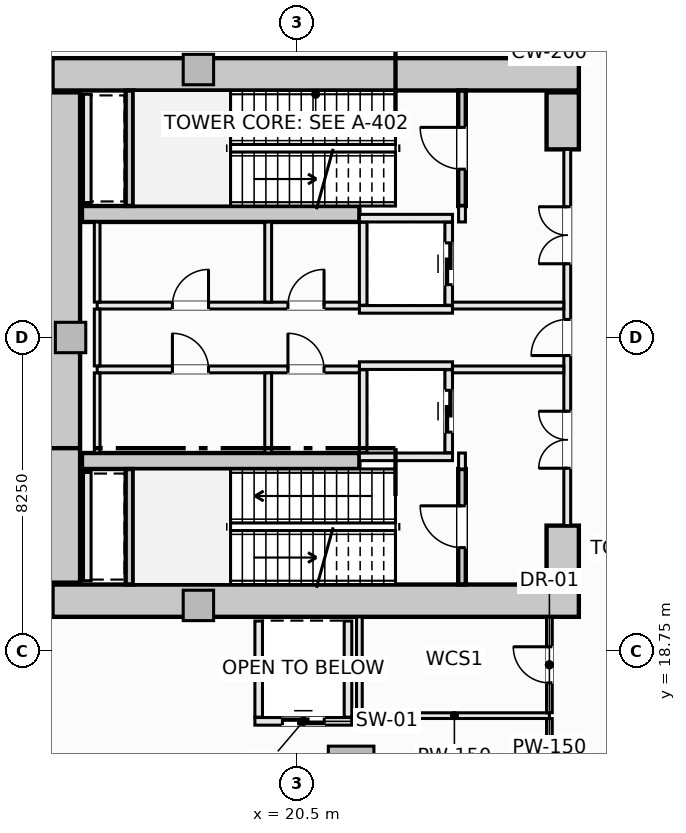
"""IFC4 building model, lengths in metres.
Left out: names, types, materials, properties, quantities, classifications, styles, units other than length and angle.
Written with IfcOpenShell. Run it as: python <this file> out.ifc"""

import sys

from ifc_helpers import new_model, si_unit, direction, frame, frame_2d, origin, origin_2d, place, context, subcontext, project, spatial, rectangle, extrude, element, fill, save


model = new_model("IFC4")
c1 = context("Model", 3, precision=1e-05, world=origin(), true_north=direction((0.0, 1.0)))
c2 = subcontext(c1, "Body", "Model", "MODEL_VIEW")
j1 = project(units=[si_unit("LENGTHUNIT", "METRE"), si_unit("PLANEANGLEUNIT", "RADIAN")], contexts=[c1])
p1 = place(None, origin())
s1 = spatial("IfcSite", under=j1, at=p1, CompositionType="ELEMENT")
p2 = place(p1, origin())
s2 = spatial("IfcBuilding", under=s1, at=p2, CompositionType="ELEMENT")
p3 = place(p2, origin())
s3 = spatial("IfcBuildingStorey", under=s2, at=p3, CompositionType="ELEMENT", Elevation=0.0)
for number, where, z_axis, x_axis in (
    (1, (14.075, 33.925, -0.36), (0.0, 0.0, 1.0), (1.0, 0.0, 0.0)),
    (2, (14.075, 20.075, -0.36), (0.0, 0.0, 1.0), (1.0, 0.0, 0.0)),
):
    element("IfcWall", number, at=place(p3, frame(where, z_axis=z_axis, x_axis=x_axis)), inside=s3, PredefinedType="SHEAR", context=c2, shape_type="SweptSolid", body=[
        extrude(rectangle(XDim=13.85, YDim=0.85, at=frame_2d((6.925, 0.0))), origin(), (0.0, 0.0, 1.0), 5.1),
    ])
p4 = place(p3, frame((14.375, 20.55, -0.36), z_axis=(0.0, 0.0, 1.0), x_axis=(0.0, 1.0, 0.0)))
e3 = element("IfcWall", 3, at=p4, inside=s3, PredefinedType="SHEAR", context=c2, shape_type="SweptSolid", body=[
    extrude(rectangle(XDim=12.9, YDim=0.85, at=frame_2d((6.45, 0.0))), origin(), (0.0, 0.0, 1.0), 5.1),
])
for number, where, z_axis, x_axis in (
    (4, (27.5, 31.95, -0.36), (0.0, 0.0, 1.0), (0.0, 1.0, 0.0)),
    (5, (27.5, 20.55, -0.36), (0.0, 0.0, 1.0), (0.0, 1.0, 0.0)),
):
    element("IfcWall", number, at=place(p3, frame(where, z_axis=z_axis, x_axis=x_axis)), inside=s3, PredefinedType="SHEAR", context=c2, shape_type="SweptSolid", body=[
        extrude(rectangle(XDim=1.5, YDim=0.85, at=frame_2d((0.75, 0.0))), origin(), (0.0, 0.0, 1.0), 5.1),
    ])
for number, where, z_axis, x_axis in (
    (6, (14.85, 30.25, -0.36), (0.0, 0.0, 1.0), (1.0, 0.0, 0.0)),
    (7, (14.85, 23.75, -0.36), (0.0, 0.0, 1.0), (1.0, 0.0, 0.0)),
):
    element("IfcWall", number, at=place(p3, frame(where, z_axis=z_axis, x_axis=x_axis)), inside=s3, PredefinedType="SHEAR", context=c2, shape_type="SweptSolid", body=[
        extrude(rectangle(XDim=7.3, YDim=0.42, at=frame_2d((3.65, 0.0))), origin(), (0.0, 0.0, 1.0), 5.1),
    ])
p5 = place(p3, frame((21.932, 15.648, -0.36), z_axis=(0.0, 0.0, 1.0), x_axis=(1.0, 0.0, 0.0)))
e8 = element("IfcColumn", 8, at=p5, inside=s3, PredefinedType="COLUMN", context=c2, shape_type="SweptSolid", body=[
    extrude(rectangle(XDim=1.2, YDim=1.2, at=origin_2d()), origin(), (0.0, 0.0, 1.0), 5.1),
])
for number, where, z_axis, x_axis in (
    (9, (17.914, 34.05, -0.36), (0.0, 0.0, 1.0), (1.0, 0.0, 0.0)),
    (10, (14.55, 27.0, -0.36), (0.0, 0.0, 1.0), (1.0, 0.0, 0.0)),
    (11, (17.914, 19.95, -0.36), (0.0, 0.0, 1.0), (1.0, 0.0, 0.0)),
):
    element("IfcColumn", number, at=place(p3, frame(where, z_axis=z_axis, x_axis=x_axis)), inside=s3, PredefinedType="PILASTER", context=c2, shape_type="SweptSolid", body=[
        extrude(rectangle(XDim=0.8, YDim=0.8, at=origin_2d()), origin(), (0.0, 0.0, 1.0), 5.1),
    ])
p6 = place(p3, frame((24.85, 30.46, -0.36), z_axis=(0.0, 0.0, 1.0), x_axis=(0.0, 1.0, 0.0)))
e12 = element("IfcWall", 12, at=p6, inside=s3, PredefinedType="SHEAR", context=c2, shape_type="SweptSolid", body=[
    extrude(rectangle(XDim=3.038, YDim=0.2, at=frame_2d((1.519, 0.0))), origin(), (0.0, 0.0, 1.0), 5.1),
])
p7 = place(p6, frame((0.969, 0.0, 0.36)))
e13 = element("IfcOpeningElement", 13, at=p7, cuts=e12, PredefinedType="OPENING", context=c2, shape_type="SweptSolid", body=[
    extrude(rectangle(XDim=1.1, YDim=2.15, at=frame_2d((0.55, 1.075))), frame((0.0, 0.11, 0.0), z_axis=(0.0, -1.0, 0.0), x_axis=(1.0, 0.0, 0.0)), (0.0, 0.0, 1.0), 0.22),
])
p8 = place(p3, frame((16.1, 30.462, -0.36), z_axis=(0.0, 0.0, 1.0), x_axis=(0.0, 1.0, 0.0)))
e14 = element("IfcWall", 14, at=p8, inside=s3, PredefinedType="SHEAR", context=c2, shape_type="SweptSolid", body=[
    extrude(rectangle(XDim=3.036, YDim=0.2, at=frame_2d((1.518, 0.0))), origin(), (0.0, 0.0, 1.0), 5.1),
])
p9 = place(p3, frame((24.85, 20.502, -0.36), z_axis=(0.0, 0.0, 1.0), x_axis=(0.0, 1.0, 0.0)))
e15 = element("IfcWall", 15, at=p9, inside=s3, PredefinedType="SHEAR", context=c2, shape_type="SweptSolid", body=[
    extrude(rectangle(XDim=3.038, YDim=0.2, at=frame_2d((1.519, 0.0))), origin(), (0.0, 0.0, 1.0), 5.1),
])
p10 = place(p9, frame((0.969, 0.0, 0.36)))
e16 = element("IfcOpeningElement", 16, at=p10, cuts=e15, PredefinedType="OPENING", context=c2, shape_type="SweptSolid", body=[
    extrude(rectangle(XDim=1.1, YDim=2.15, at=frame_2d((0.55, 1.075))), frame((0.0, 0.11, 0.0), z_axis=(0.0, -1.0, 0.0), x_axis=(1.0, 0.0, 0.0)), (0.0, 0.0, 1.0), 0.22),
])
p11 = place(p3, frame((16.1, 20.502, -0.36), z_axis=(0.0, 0.0, 1.0), x_axis=(0.0, 1.0, 0.0)))
e17 = element("IfcWall", 17, at=p11, inside=s3, PredefinedType="SHEAR", context=c2, shape_type="SweptSolid", body=[
    extrude(rectangle(XDim=3.036, YDim=0.2, at=frame_2d((1.518, 0.0))), origin(), (0.0, 0.0, 1.0), 5.1),
])
for number, where, z_axis, x_axis in (
    (18, (22.15, 30.14, 0.0), (0.0, 0.0, 1.0), (1.0, 0.0, 0.0)),
    (19, (22.15, 27.74, 0.0), (0.0, 0.0, 1.0), (1.0, 0.0, 0.0)),
):
    element("IfcWall", number, at=place(p3, frame(where, z_axis=z_axis, x_axis=x_axis)), inside=s3, PredefinedType="SOLIDWALL", context=c2, shape_type="SweptSolid", body=[
        extrude(rectangle(XDim=2.45, YDim=0.2, at=frame_2d((1.225, 0.0))), origin(), (0.0, 0.0, 1.0), 4.74),
    ])
p12 = place(p3, frame((22.25, 27.85, 0.0), z_axis=(0.0, 0.0, 1.0), x_axis=(0.0, 1.0, 0.0)))
e20 = element("IfcWall", 20, at=p12, inside=s3, PredefinedType="SOLIDWALL", context=c2, shape_type="SweptSolid", body=[
    extrude(rectangle(XDim=2.18, YDim=0.2, at=frame_2d((1.09, 0.0))), origin(), (0.0, 0.0, 1.0), 4.74),
])
p13 = place(p3, frame((24.5, 27.85, 0.0), z_axis=(0.0, 0.0, 1.0), x_axis=(0.0, 1.0, 0.0)))
e21 = element("IfcWall", 21, at=p13, inside=s3, PredefinedType="SOLIDWALL", context=c2, shape_type="SweptSolid", body=[
    extrude(rectangle(XDim=2.18, YDim=0.2, at=frame_2d((1.09, 0.0))), origin(), (0.0, 0.0, 1.0), 4.74),
])
p14 = place(p13, frame((0.54, 0.0, 0.0)))
e22 = element("IfcOpeningElement", 22, at=p14, cuts=e21, PredefinedType="OPENING", context=c2, shape_type="SweptSolid", body=[
    extrude(rectangle(XDim=1.1, YDim=2.2, at=frame_2d((0.55, 1.1))), frame((0.0, 0.11, 0.0), z_axis=(0.0, -1.0, 0.0), x_axis=(1.0, 0.0, 0.0)), (0.0, 0.0, 1.0), 0.22),
])
for number, where, z_axis, x_axis in (
    (23, (22.15, 26.26, 0.0), (0.0, 0.0, 1.0), (1.0, 0.0, 0.0)),
    (24, (22.15, 23.86, 0.0), (0.0, 0.0, 1.0), (1.0, 0.0, 0.0)),
):
    element("IfcWall", number, at=place(p3, frame(where, z_axis=z_axis, x_axis=x_axis)), inside=s3, PredefinedType="SOLIDWALL", context=c2, shape_type="SweptSolid", body=[
        extrude(rectangle(XDim=2.45, YDim=0.2, at=frame_2d((1.225, 0.0))), origin(), (0.0, 0.0, 1.0), 4.74),
    ])
p15 = place(p3, frame((22.25, 23.97, 0.0), z_axis=(0.0, 0.0, 1.0), x_axis=(0.0, 1.0, 0.0)))
e25 = element("IfcWall", 25, at=p15, inside=s3, PredefinedType="SOLIDWALL", context=c2, shape_type="SweptSolid", body=[
    extrude(rectangle(XDim=2.18, YDim=0.2, at=frame_2d((1.09, 0.0))), origin(), (0.0, 0.0, 1.0), 4.74),
])
p16 = place(p3, frame((24.5, 23.97, 0.0), z_axis=(0.0, 0.0, 1.0), x_axis=(0.0, 1.0, 0.0)))
e26 = element("IfcWall", 26, at=p16, inside=s3, PredefinedType="SOLIDWALL", context=c2, shape_type="SweptSolid", body=[
    extrude(rectangle(XDim=2.18, YDim=0.2, at=frame_2d((1.09, 0.0))), origin(), (0.0, 0.0, 1.0), 4.74),
])
p17 = place(p16, frame((0.54, 0.0, 0.0)))
e27 = element("IfcOpeningElement", 27, at=p17, cuts=e26, PredefinedType="OPENING", context=c2, shape_type="SweptSolid", body=[
    extrude(rectangle(XDim=1.1, YDim=2.2, at=frame_2d((0.55, 1.1))), frame((0.0, 0.11, 0.0), z_axis=(0.0, -1.0, 0.0), x_axis=(1.0, 0.0, 0.0)), (0.0, 0.0, 1.0), 0.22),
])
p18 = place(p3, frame((19.4, 16.9, 0.0), z_axis=(0.0, 0.0, 1.0), x_axis=(1.0, 0.0, 0.0)))
e28 = element("IfcWall", 28, at=p18, inside=s3, PredefinedType="SOLIDWALL", context=c2, shape_type="SweptSolid", body=[
    extrude(rectangle(XDim=2.55, YDim=0.2, at=frame_2d((1.275, 0.0))), origin(), (0.0, 0.0, 1.0), 4.74),
])
p19 = place(p18, frame((0.725, 0.0, 0.0)))
e29 = element("IfcOpeningElement", 29, at=p19, cuts=e28, PredefinedType="OPENING", context=c2, shape_type="SweptSolid", body=[
    extrude(rectangle(XDim=1.1, YDim=2.2, at=frame_2d((0.55, 1.1))), frame((0.0, 0.11, 0.0), z_axis=(0.0, -1.0, 0.0), x_axis=(1.0, 0.0, 0.0)), (0.0, 0.0, 1.0), 0.22),
])
for number, where, z_axis, x_axis in (
    (30, (19.5, 17.01, 0.0), (0.0, 0.0, 1.0), (0.0, 1.0, 0.0)),
    (31, (21.85, 17.01, 0.0), (0.0, 0.0, 1.0), (0.0, 1.0, 0.0)),
):
    element("IfcWall", number, at=place(p3, frame(where, z_axis=z_axis, x_axis=x_axis)), inside=s3, PredefinedType="SOLIDWALL", context=c2, shape_type="SweptSolid", body=[
        extrude(rectangle(XDim=2.53, YDim=0.2, at=frame_2d((1.265, 0.0))), origin(), (0.0, 0.0, 1.0), 4.74),
    ])
for number, where, z_axis, x_axis in (
    (32, (14.99, 30.55, 0.0), (0.0, 0.0, 1.0), (0.0, 1.0, 0.0)),
    (33, (14.99, 20.6, 0.0), (0.0, 0.0, 1.0), (0.0, 1.0, 0.0)),
):
    element("IfcWall", number, at=place(p3, frame(where, z_axis=z_axis, x_axis=x_axis)), inside=s3, PredefinedType="SOLIDWALL", context=c2, shape_type="SweptSolid", body=[
        extrude(rectangle(XDim=2.85, YDim=0.2, at=frame_2d((1.425, 0.0))), origin(), (0.0, 0.0, 1.0), 4.74),
    ])
for number, where, z_axis, x_axis in (
    (34, (24.85, 23.54, 0.0), (0.0, 0.0, 1.0), (0.0, 1.0, 0.0)),
    (35, (24.85, 30.04, 0.0), (0.0, 0.0, 1.0), (0.0, 1.0, 0.0)),
):
    element("IfcWall", number, at=place(p3, frame(where, z_axis=z_axis, x_axis=x_axis)), inside=s3, PredefinedType="SOLIDWALL", context=c2, shape_type="SweptSolid", body=[
        extrude(rectangle(XDim=0.42, YDim=0.18, at=frame_2d((0.21, 0.0))), origin(), (0.0, 0.0, 1.0), 4.74),
    ])
p20 = place(p3, frame((27.62, 22.05, 0.0), z_axis=(0.0, 0.0, 1.0), x_axis=(0.0, 1.0, 0.0)))
e36 = element("IfcWall", 36, at=p20, inside=s3, PredefinedType="SOLIDWALL", context=c2, shape_type="SweptSolid", body=[
    extrude(rectangle(XDim=9.9, YDim=0.18, at=frame_2d((4.95, 0.0))), origin(), (0.0, 0.0, 1.0), 3.832),
])
p21 = place(p20, frame((4.475, 0.0, 0.0)))
e37 = element("IfcOpeningElement", 37, at=p21, cuts=e36, PredefinedType="OPENING", context=c2, shape_type="SweptSolid", body=[
    extrude(rectangle(XDim=0.95, YDim=2.1, at=frame_2d((0.475, 1.05))), frame((0.0, 0.1, 0.0), z_axis=(0.0, -1.0, 0.0), x_axis=(1.0, 0.0, 0.0)), (0.0, 0.0, 1.0), 0.2),
])
p22 = place(p20, frame((6.89, 0.0, 0.0)))
e38 = element("IfcOpeningElement", 38, at=p22, cuts=e36, PredefinedType="OPENING", context=c2, shape_type="SweptSolid", body=[
    extrude(rectangle(XDim=1.5, YDim=2.2, at=frame_2d((0.75, 1.1))), frame((0.0, 0.1, 0.0), z_axis=(0.0, -1.0, 0.0), x_axis=(1.0, 0.0, 0.0)), (0.0, 0.0, 1.0), 0.2),
])
p23 = place(p20, frame((1.51, 0.0, 0.0)))
e39 = element("IfcOpeningElement", 39, at=p23, cuts=e36, PredefinedType="OPENING", context=c2, shape_type="SweptSolid", body=[
    extrude(rectangle(XDim=1.5, YDim=2.2, at=frame_2d((0.75, 1.1))), frame((0.0, 0.1, 0.0), z_axis=(0.0, -1.0, 0.0), x_axis=(1.0, 0.0, 0.0)), (0.0, 0.0, 1.0), 0.2),
])
p24 = place(p3, frame((15.25, 27.84, 0.0), z_axis=(0.0, 0.0, 1.0), x_axis=(1.0, 0.0, 0.0)))
e40 = element("IfcWall", 40, at=p24, inside=s3, PredefinedType="SOLIDWALL", context=c2, shape_type="SweptSolid", body=[
    extrude(rectangle(XDim=6.9, YDim=0.18, at=frame_2d((3.45, 0.0))), origin(), (0.0, 0.0, 1.0), 4.74),
])
p25 = place(p24, frame((5.02, 0.0, 0.0)))
e41 = element("IfcOpeningElement", 41, at=p25, cuts=e40, PredefinedType="OPENING", context=c2, shape_type="SweptSolid", body=[
    extrude(rectangle(XDim=0.95, YDim=2.1, at=frame_2d((0.475, 1.05))), frame((0.0, 0.1, 0.0), z_axis=(0.0, -1.0, 0.0), x_axis=(1.0, 0.0, 0.0)), (0.0, 0.0, 1.0), 0.2),
])
p26 = place(p24, frame((1.98, 0.0, 0.0)))
e42 = element("IfcOpeningElement", 42, at=p26, cuts=e40, PredefinedType="OPENING", context=c2, shape_type="SweptSolid", body=[
    extrude(rectangle(XDim=0.95, YDim=2.1, at=frame_2d((0.475, 1.05))), frame((0.0, 0.1, 0.0), z_axis=(0.0, -1.0, 0.0), x_axis=(1.0, 0.0, 0.0)), (0.0, 0.0, 1.0), 0.2),
])
p27 = place(p3, frame((24.6, 27.84, 0.0), z_axis=(0.0, 0.0, 1.0), x_axis=(1.0, 0.0, 0.0)))
e43 = element("IfcWall", 43, at=p27, inside=s3, PredefinedType="SOLIDWALL", context=c2, shape_type="SweptSolid", body=[
    extrude(rectangle(XDim=2.928, YDim=0.18, at=frame_2d((1.464, 0.0))), origin(), (0.0, 0.0, 1.0), 4.74),
])
p28 = place(p3, frame((15.25, 26.16, 0.0), z_axis=(0.0, 0.0, 1.0), x_axis=(1.0, 0.0, 0.0)))
e44 = element("IfcWall", 44, at=p28, inside=s3, PredefinedType="SOLIDWALL", context=c2, shape_type="SweptSolid", body=[
    extrude(rectangle(XDim=6.9, YDim=0.18, at=frame_2d((3.45, 0.0))), origin(), (0.0, 0.0, 1.0), 4.74),
])
p29 = place(p28, frame((5.02, 0.0, 0.0)))
e45 = element("IfcOpeningElement", 45, at=p29, cuts=e44, PredefinedType="OPENING", context=c2, shape_type="SweptSolid", body=[
    extrude(rectangle(XDim=0.95, YDim=2.1, at=frame_2d((0.475, 1.05))), frame((0.0, 0.1, 0.0), z_axis=(0.0, -1.0, 0.0), x_axis=(1.0, 0.0, 0.0)), (0.0, 0.0, 1.0), 0.2),
])
p30 = place(p28, frame((1.98, 0.0, 0.0)))
e46 = element("IfcOpeningElement", 46, at=p30, cuts=e44, PredefinedType="OPENING", context=c2, shape_type="SweptSolid", body=[
    extrude(rectangle(XDim=0.95, YDim=2.1, at=frame_2d((0.475, 1.05))), frame((0.0, 0.1, 0.0), z_axis=(0.0, -1.0, 0.0), x_axis=(1.0, 0.0, 0.0)), (0.0, 0.0, 1.0), 0.2),
])
p31 = place(p3, frame((24.6, 26.16, 0.0), z_axis=(0.0, 0.0, 1.0), x_axis=(1.0, 0.0, 0.0)))
e47 = element("IfcWall", 47, at=p31, inside=s3, PredefinedType="SOLIDWALL", context=c2, shape_type="SweptSolid", body=[
    extrude(rectangle(XDim=2.928, YDim=0.18, at=frame_2d((1.464, 0.0))), origin(), (0.0, 0.0, 1.0), 4.74),
])
p32 = place(p3, frame((15.25, 23.962, 0.0), z_axis=(0.0, 0.0, 1.0), x_axis=(0.0, 1.0, 0.0)))
e48 = element("IfcWall", 48, at=p32, inside=s3, PredefinedType="PARTITIONING", context=c2, shape_type="SweptSolid", body=[
    extrude(rectangle(XDim=2.106, YDim=0.15, at=frame_2d((1.053, 0.0))), origin(), (0.0, 0.0, 1.0), 4.74),
])
p33 = place(p3, frame((15.25, 26.252, 0.0), z_axis=(0.0, 0.0, 1.0), x_axis=(0.0, 1.0, 0.0)))
e49 = element("IfcWall", 49, at=p33, inside=s3, PredefinedType="PARTITIONING", context=c2, shape_type="SweptSolid", body=[
    extrude(rectangle(XDim=1.496, YDim=0.15, at=frame_2d((0.748, 0.0))), origin(), (0.0, 0.0, 1.0), 4.74),
])
p34 = place(p3, frame((15.25, 27.932, 0.0), z_axis=(0.0, 0.0, 1.0), x_axis=(0.0, 1.0, 0.0)))
e50 = element("IfcWall", 50, at=p34, inside=s3, PredefinedType="PARTITIONING", context=c2, shape_type="SweptSolid", body=[
    extrude(rectangle(XDim=2.106, YDim=0.15, at=frame_2d((1.053, 0.0))), origin(), (0.0, 0.0, 1.0), 4.74),
])
for number, where, z_axis, x_axis in (
    (51, (19.75, 23.962, 0.0), (0.0, 0.0, 1.0), (0.0, 1.0, 0.0)),
    (52, (19.75, 27.932, 0.0), (0.0, 0.0, 1.0), (0.0, 1.0, 0.0)),
):
    element("IfcWall", number, at=place(p3, frame(where, z_axis=z_axis, x_axis=x_axis)), inside=s3, PredefinedType="SOLIDWALL", context=c2, shape_type="SweptSolid", body=[
        extrude(rectangle(XDim=2.106, YDim=0.18, at=frame_2d((1.053, 0.0))), origin(), (0.0, 0.0, 1.0), 4.74),
    ])
p35 = place(p3, frame((22.15, 17.05, 0.0), z_axis=(0.0, 0.0, 1.0), x_axis=(1.0, 0.0, 0.0)))
e53 = element("IfcWall", 53, at=p35, inside=s3, PredefinedType="PARTITIONING", context=c2, shape_type="SweptSolid", body=[
    extrude(rectangle(XDim=5.0, YDim=0.15, at=frame_2d((2.5, 0.0))), origin(), (0.0, 0.0, 1.0), 4.74),
])
p36 = place(p3, frame((22.15, 17.127, 0.0), z_axis=(0.0, 0.0, 1.0), x_axis=(0.0, 1.0, 0.0)))
e54 = element("IfcWall", 54, at=p36, inside=s3, PredefinedType="PARTITIONING", context=c2, shape_type="SweptSolid", body=[
    extrude(rectangle(XDim=2.521, YDim=0.15, at=frame_2d((1.26, 0.0))), origin(), (0.0, 0.0, 1.0), 4.74),
])
p37 = place(p3, frame((27.15, 11.75, 0.0), z_axis=(0.0, 0.0, 1.0), x_axis=(0.0, 1.0, 0.0)))
e55 = element("IfcWall", 55, at=p37, inside=s3, PredefinedType="PARTITIONING", context=c2, shape_type="SweptSolid", body=[
    extrude(rectangle(XDim=5.223, YDim=0.15, at=frame_2d((2.611, 0.0))), origin(), (0.0, 0.0, 1.0), 4.74),
])
p38 = place(p3, frame((27.15, 17.127, 0.0), z_axis=(0.0, 0.0, 1.0), x_axis=(0.0, 1.0, 0.0)))
e56 = element("IfcWall", 56, at=p38, inside=s3, PredefinedType="PARTITIONING", context=c2, shape_type="SweptSolid", body=[
    extrude(rectangle(XDim=2.521, YDim=0.15, at=frame_2d((1.26, 0.0))), origin(), (0.0, 0.0, 1.0), 4.74),
])
p39 = place(p38, frame((0.785, 0.0, 0.0)))
e57 = element("IfcOpeningElement", 57, at=p39, cuts=e56, PredefinedType="OPENING", context=c2, shape_type="SweptSolid", body=[
    extrude(rectangle(XDim=0.95, YDim=2.1, at=frame_2d((0.475, 1.05))), frame((0.0, 0.085, 0.0), z_axis=(0.0, -1.0, 0.0), x_axis=(1.0, 0.0, 0.0)), (0.0, 0.0, 1.0), 0.17),
])
p40 = place(p3, frame((27.25, 34.352, 0.0), z_axis=(0.0, 0.0, 1.0), x_axis=(0.0, 1.0, 0.0)))
e58 = element("IfcWall", 58, at=p40, inside=s3, PredefinedType="PARTITIONING", context=c2, shape_type="SweptSolid", body=[
    extrude(rectangle(XDim=0.606, YDim=0.12, at=frame_2d((0.303, 0.0))), origin(), (0.0, 0.0, 1.0), 4.74),
])
p41 = place(p7, origin())
e59 = element("IfcDoor", 59, at=p41, inside=s3, OperationType="SINGLE_SWING_RIGHT", PredefinedType="DOOR", context=c2, shape_type="SweptSolid", body=[
    extrude(rectangle(XDim=1.1, YDim=2.15, at=frame_2d((0.55, 1.075))), frame((0.0, 0.025, 0.0), z_axis=(0.0, -1.0, 0.0), x_axis=(1.0, 0.0, 0.0)), (0.0, 0.0, 1.0), 0.05),
])
fill(e13, e59)
p42 = place(p10, origin())
e60 = element("IfcDoor", 60, at=p42, inside=s3, OperationType="SINGLE_SWING_RIGHT", PredefinedType="DOOR", context=c2, shape_type="SweptSolid", body=[
    extrude(rectangle(XDim=1.1, YDim=2.15, at=frame_2d((0.55, 1.075))), frame((0.0, 0.025, 0.0), z_axis=(0.0, -1.0, 0.0), x_axis=(1.0, 0.0, 0.0)), (0.0, 0.0, 1.0), 0.05),
])
fill(e16, e60)
p43 = place(p14, origin())
e61 = element("IfcDoor", 61, at=p43, inside=s3, OperationType="SLIDING_TO_LEFT", PredefinedType="DOOR", context=c2, shape_type="SweptSolid", body=[
    extrude(rectangle(XDim=1.1, YDim=2.2, at=frame_2d((0.55, 1.1))), frame((0.0, 0.025, 0.0), z_axis=(0.0, -1.0, 0.0), x_axis=(1.0, 0.0, 0.0)), (0.0, 0.0, 1.0), 0.05),
])
fill(e22, e61)
p44 = place(p17, origin())
e62 = element("IfcDoor", 62, at=p44, inside=s3, OperationType="SLIDING_TO_LEFT", PredefinedType="DOOR", context=c2, shape_type="SweptSolid", body=[
    extrude(rectangle(XDim=1.1, YDim=2.2, at=frame_2d((0.55, 1.1))), frame((0.0, 0.025, 0.0), z_axis=(0.0, -1.0, 0.0), x_axis=(1.0, 0.0, 0.0)), (0.0, 0.0, 1.0), 0.05),
])
fill(e27, e62)
p45 = place(p19, origin())
e63 = element("IfcDoor", 63, at=p45, inside=s3, OperationType="SLIDING_TO_LEFT", PredefinedType="DOOR", context=c2, shape_type="SweptSolid", body=[
    extrude(rectangle(XDim=1.1, YDim=2.2, at=frame_2d((0.55, 1.1))), frame((0.0, 0.025, 0.0), z_axis=(0.0, -1.0, 0.0), x_axis=(1.0, 0.0, 0.0)), (0.0, 0.0, 1.0), 0.05),
])
fill(e29, e63)
p46 = place(p21, origin())
e64 = element("IfcDoor", 64, at=p46, inside=s3, OperationType="SINGLE_SWING_LEFT", PredefinedType="DOOR", context=c2, shape_type="SweptSolid", body=[
    extrude(rectangle(XDim=0.95, YDim=2.1, at=frame_2d((0.475, 1.05))), frame((0.0, 0.025, 0.0), z_axis=(0.0, -1.0, 0.0), x_axis=(1.0, 0.0, 0.0)), (0.0, 0.0, 1.0), 0.05),
])
fill(e37, e64)
p47 = place(p22, origin())
e65 = element("IfcDoor", 65, at=p47, inside=s3, OperationType="DOUBLE_DOOR_SINGLE_SWING", PredefinedType="DOOR", context=c2, shape_type="SweptSolid", body=[
    extrude(rectangle(XDim=1.5, YDim=2.2, at=frame_2d((0.75, 1.1))), frame((0.0, 0.025, 0.0), z_axis=(0.0, -1.0, 0.0), x_axis=(1.0, 0.0, 0.0)), (0.0, 0.0, 1.0), 0.05),
])
fill(e38, e65)
p48 = place(p23, origin())
e66 = element("IfcDoor", 66, at=p48, inside=s3, OperationType="DOUBLE_DOOR_SINGLE_SWING", PredefinedType="DOOR", context=c2, shape_type="SweptSolid", body=[
    extrude(rectangle(XDim=1.5, YDim=2.2, at=frame_2d((0.75, 1.1))), frame((0.0, 0.025, 0.0), z_axis=(0.0, -1.0, 0.0), x_axis=(1.0, 0.0, 0.0)), (0.0, 0.0, 1.0), 0.05),
])
fill(e39, e66)
p49 = place(p25, origin())
e67 = element("IfcDoor", 67, at=p49, inside=s3, OperationType="SINGLE_SWING_RIGHT", PredefinedType="DOOR", context=c2, shape_type="SweptSolid", body=[
    extrude(rectangle(XDim=0.95, YDim=2.1, at=frame_2d((0.475, 1.05))), frame((0.0, 0.025, 0.0), z_axis=(0.0, -1.0, 0.0), x_axis=(1.0, 0.0, 0.0)), (0.0, 0.0, 1.0), 0.05),
])
fill(e41, e67)
p50 = place(p29, origin())
e68 = element("IfcDoor", 68, at=p50, inside=s3, OperationType="SINGLE_SWING_LEFT", PredefinedType="DOOR", context=c2, shape_type="SweptSolid", body=[
    extrude(rectangle(XDim=0.95, YDim=2.1, at=frame_2d((0.475, 1.05))), frame((0.0, 0.025, 0.0), z_axis=(0.0, -1.0, 0.0), x_axis=(1.0, 0.0, 0.0)), (0.0, 0.0, 1.0), 0.05),
])
fill(e45, e68)
p51 = place(p26, origin())
e69 = element("IfcDoor", 69, at=p51, inside=s3, OperationType="SINGLE_SWING_RIGHT", PredefinedType="DOOR", context=c2, shape_type="SweptSolid", body=[
    extrude(rectangle(XDim=0.95, YDim=2.1, at=frame_2d((0.475, 1.05))), frame((0.0, 0.025, 0.0), z_axis=(0.0, -1.0, 0.0), x_axis=(1.0, 0.0, 0.0)), (0.0, 0.0, 1.0), 0.05),
])
fill(e42, e69)
p52 = place(p30, origin())
e70 = element("IfcDoor", 70, at=p52, inside=s3, OperationType="SINGLE_SWING_LEFT", PredefinedType="DOOR", context=c2, shape_type="SweptSolid", body=[
    extrude(rectangle(XDim=0.95, YDim=2.1, at=frame_2d((0.475, 1.05))), frame((0.0, 0.025, 0.0), z_axis=(0.0, -1.0, 0.0), x_axis=(1.0, 0.0, 0.0)), (0.0, 0.0, 1.0), 0.05),
])
fill(e46, e70)
p53 = place(p39, origin())
e71 = element("IfcDoor", 71, at=p53, inside=s3, OperationType="SINGLE_SWING_RIGHT", PredefinedType="DOOR", context=c2, shape_type="SweptSolid", body=[
    extrude(rectangle(XDim=0.95, YDim=2.1, at=frame_2d((0.475, 1.05))), frame((0.0, 0.025, 0.0), z_axis=(0.0, -1.0, 0.0), x_axis=(1.0, 0.0, 0.0)), (0.0, 0.0, 1.0), 0.05),
])
fill(e57, e71)
save(model, sys.argv[1])
